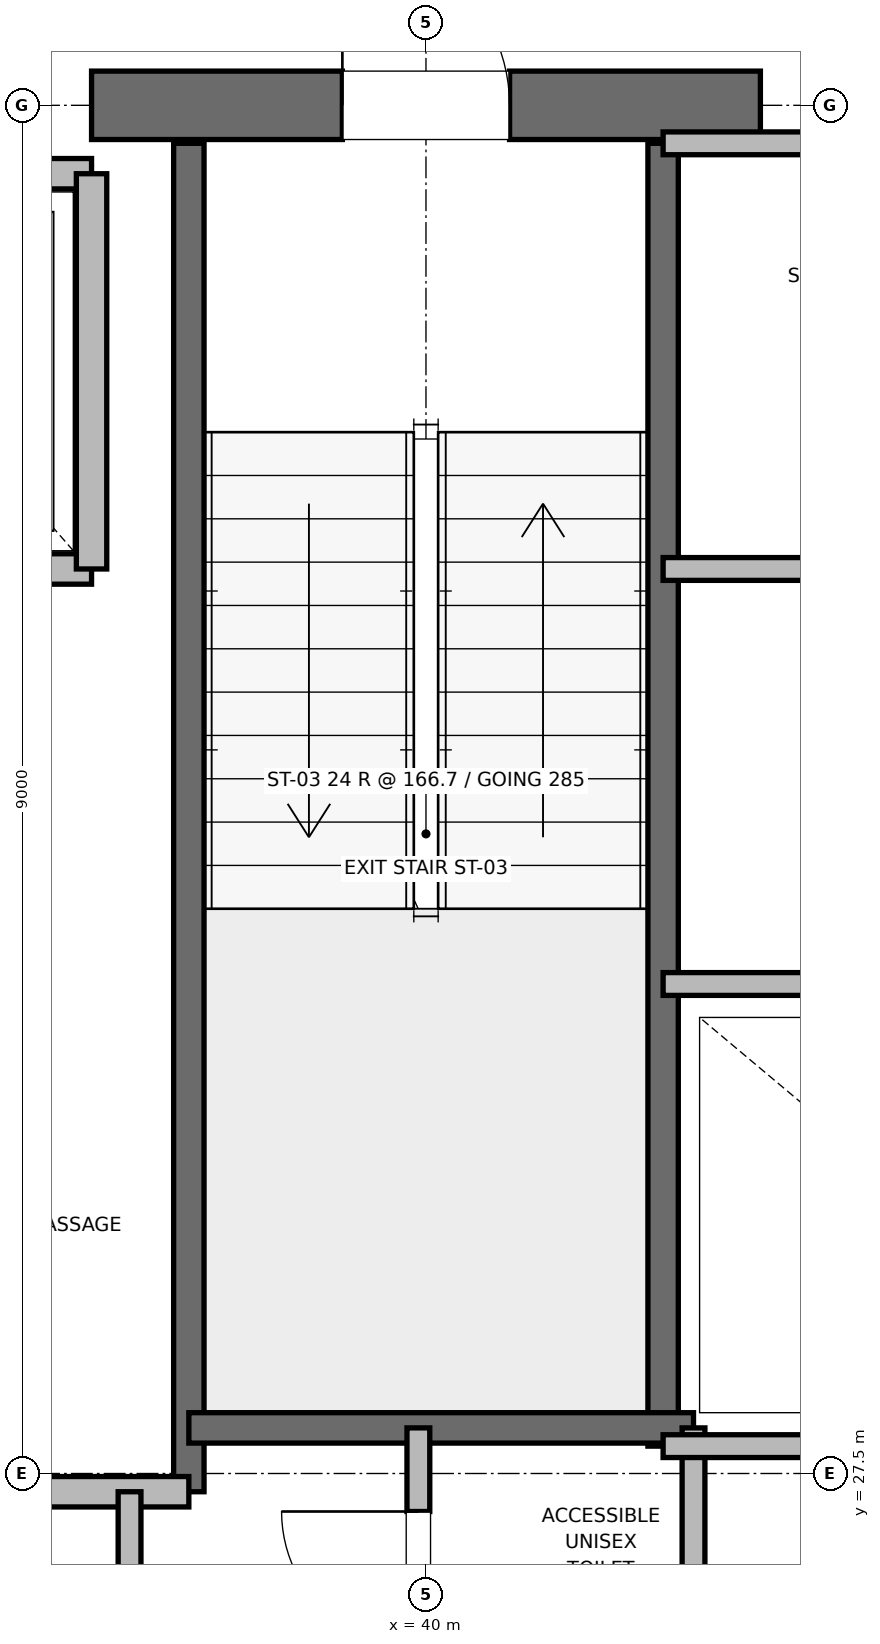
"""IFC4 building model, lengths in metres.
Left out: names, types, materials, properties, quantities, classifications, styles, units other than length and angle.
Written with IfcOpenShell. Run it as: python <this file> out.ifc"""

import sys

from ifc_helpers import new_model, si_unit, direction, frame, frame_2d, origin, place, context, subcontext, project, spatial, rectangle, extrude, element, fill, save


model = new_model("IFC4")
c1 = context("Model", 3, precision=1e-05, world=origin(), true_north=direction((0.0, 1.0)))
c2 = subcontext(c1, "Body", "Model", "MODEL_VIEW")
j1 = project(units=[si_unit("LENGTHUNIT", "METRE"), si_unit("PLANEANGLEUNIT", "RADIAN")], contexts=[c1])
p1 = place(None, origin())
s1 = spatial("IfcSite", under=j1, at=p1, CompositionType="ELEMENT")
p2 = place(p1, origin())
s2 = spatial("IfcBuilding", under=s1, at=p2, CompositionType="ELEMENT")
p3 = place(p2, frame((0.0, 0.0, 275.2)))
s3 = spatial("IfcBuildingStorey", under=s2, at=p3, CompositionType="ELEMENT", Elevation=275.2)
p4 = place(p3, frame((37.8, 36.5, 0.0), z_axis=(0.0, 0.0, 1.0), x_axis=(1.0, 0.0, 0.0)))
e1 = element("IfcWall", 1, at=p4, inside=s3, PredefinedType="SHEAR", context=c2, shape_type="SweptSolid", body=[
    extrude(rectangle(XDim=4.4, YDim=0.45, at=frame_2d((2.2, 0.0))), origin(), (0.0, 0.0, 1.0), 3.785),
])
p5 = place(p4, frame((1.65, 0.0, 0.0)))
e2 = element("IfcOpeningElement", 2, at=p5, cuts=e1, PredefinedType="OPENING", context=c2, shape_type="SweptSolid", body=[
    extrude(rectangle(XDim=1.1, YDim=2.15, at=frame_2d((0.55, 1.075))), frame((0.0, 0.225, 0.0), z_axis=(0.0, -1.0, 0.0), x_axis=(1.0, 0.0, 0.0)), (0.0, 0.0, 1.0), 0.45),
])
p6 = place(p3, frame((38.44, 27.38, 0.0), z_axis=(0.0, 0.0, 1.0), x_axis=(0.0, 1.0, 0.0)))
e3 = element("IfcWall", 3, at=p6, inside=s3, PredefinedType="SOLIDWALL", context=c2, shape_type="SweptSolid", body=[
    extrude(rectangle(XDim=8.87, YDim=0.2, at=frame_2d((4.435, 0.0))), origin(), (0.0, 0.0, 1.0), 3.785),
])
p7 = place(p3, frame((41.56, 27.68, 0.0), z_axis=(0.0, 0.0, 1.0), x_axis=(0.0, 1.0, 0.0)))
e4 = element("IfcWall", 4, at=p7, inside=s3, PredefinedType="SOLIDWALL", context=c2, shape_type="SweptSolid", body=[
    extrude(rectangle(XDim=8.57, YDim=0.2, at=frame_2d((4.285, 0.0))), origin(), (0.0, 0.0, 1.0), 3.785),
])
p8 = place(p3, frame((38.44, 27.8, 0.0), z_axis=(0.0, 0.0, 1.0), x_axis=(1.0, 0.0, 0.0)))
e5 = element("IfcWall", 5, at=p8, inside=s3, PredefinedType="SOLIDWALL", context=c2, shape_type="SweptSolid", body=[
    extrude(rectangle(XDim=3.32, YDim=0.2, at=frame_2d((1.66, 0.0))), origin(), (0.0, 0.0, 1.0), 3.785),
])
p9 = place(p3, frame((32.82, 27.38, 0.0), z_axis=(0.0, 0.0, 1.0), x_axis=(1.0, 0.0, 0.0)))
e6 = element("IfcWall", 6, at=p9, inside=s3, PredefinedType="PARTITIONING", context=c2, shape_type="SweptSolid", body=[
    extrude(rectangle(XDim=5.62, YDim=0.2, at=frame_2d((2.81, 0.0))), origin(), (0.0, 0.0, 1.0), 3.785),
])
p10 = place(p3, frame((35.5, 33.45, 0.0), z_axis=(0.0, 0.0, 1.0), x_axis=(1.0, 0.0, 0.0)))
e7 = element("IfcWall", 7, at=p10, inside=s3, PredefinedType="SOLIDWALL", context=c2, shape_type="SweptSolid", body=[
    extrude(rectangle(XDim=2.3, YDim=0.2, at=frame_2d((1.15, 0.0))), origin(), (0.0, 0.0, 1.0), 3.785),
])
p11 = place(p10, frame((0.6, 0.0, 0.0)))
e8 = element("IfcOpeningElement", 8, at=p11, cuts=e7, PredefinedType="OPENING", context=c2, shape_type="SweptSolid", body=[
    extrude(rectangle(XDim=1.1, YDim=2.2, at=frame_2d((0.55, 1.1))), frame((0.0, 0.1, 0.0), z_axis=(0.0, -1.0, 0.0), x_axis=(1.0, 0.0, 0.0)), (0.0, 0.0, 1.0), 0.2),
])
p12 = place(p3, frame((37.8, 36.05, 0.0), z_axis=(0.0, 0.0, 1.0), x_axis=(-1.0, 0.0, 0.0)))
e9 = element("IfcWall", 9, at=p12, inside=s3, PredefinedType="SOLIDWALL", context=c2, shape_type="SweptSolid", body=[
    extrude(rectangle(XDim=2.3, YDim=0.2, at=frame_2d((1.15, 0.0))), origin(), (0.0, 0.0, 1.0), 2.865),
])
p13 = place(p3, frame((37.8, 33.45, 0.0), z_axis=(0.0, 0.0, 1.0), x_axis=(0.0, 1.0, 0.0)))
e10 = element("IfcWall", 10, at=p13, inside=s3, PredefinedType="SOLIDWALL", context=c2, shape_type="SweptSolid", body=[
    extrude(rectangle(XDim=2.6, YDim=0.2, at=frame_2d((1.3, 0.0))), origin(), (0.0, 0.0, 1.0), 2.865),
])
p14 = place(p3, frame((41.76, 23.8, 0.0), z_axis=(0.0, 0.0, 1.0), x_axis=(0.0, 1.0, 0.0)))
e11 = element("IfcWall", 11, at=p14, inside=s3, PredefinedType="PARTITIONING", context=c2, shape_type="SweptSolid", body=[
    extrude(rectangle(XDim=4.0, YDim=0.15, at=frame_2d((2.0, 0.0))), origin(), (0.0, 0.0, 1.0), 2.85),
])
p15 = place(p3, frame((39.95, 25.8, 0.0), z_axis=(0.0, 0.0, 1.0), x_axis=(0.0, 1.0, 0.0)))
e12 = element("IfcWall", 12, at=p15, inside=s3, PredefinedType="PARTITIONING", context=c2, shape_type="SweptSolid", body=[
    extrude(rectangle(XDim=2.0, YDim=0.15, at=frame_2d((1.0, 0.0))), origin(), (0.0, 0.0, 1.0), 2.85),
])
p16 = place(p15, frame((0.55, 0.0, 0.0)))
e13 = element("IfcOpeningElement", 13, at=p16, cuts=e12, PredefinedType="OPENING", context=c2, shape_type="SweptSolid", body=[
    extrude(rectangle(XDim=0.9, YDim=2.1, at=frame_2d((0.45, 1.05))), frame((0.0, 0.075, 0.0), z_axis=(0.0, -1.0, 0.0), x_axis=(1.0, 0.0, 0.0)), (0.0, 0.0, 1.0), 0.15),
])
p17 = place(p3, frame((38.05, 18.6, 0.0), z_axis=(0.0, 0.0, 1.0), x_axis=(0.0, 1.0, 0.0)))
e14 = element("IfcWall", 14, at=p17, inside=s3, PredefinedType="PARTITIONING", context=c2, shape_type="SweptSolid", body=[
    extrude(rectangle(XDim=8.78, YDim=0.15, at=frame_2d((4.39, 0.0))), origin(), (0.0, 0.0, 1.0), 2.85),
])
p18 = place(p17, frame((3.89, 0.0, 0.0)))
e15 = element("IfcOpeningElement", 15, at=p18, cuts=e14, PredefinedType="OPENING", context=c2, shape_type="SweptSolid", body=[
    extrude(rectangle(XDim=1.0, YDim=2.15, at=frame_2d((0.5, 1.075))), frame((0.0, 0.075, 0.0), z_axis=(0.0, -1.0, 0.0), x_axis=(1.0, 0.0, 0.0)), (0.0, 0.0, 1.0), 0.15),
])
p19 = place(p3, frame((41.56, 27.68, 0.0), z_axis=(0.0, 0.0, 1.0), x_axis=(1.0, 0.0, 0.0)))
e16 = element("IfcWall", 16, at=p19, inside=s3, PredefinedType="PARTITIONING", context=c2, shape_type="SweptSolid", body=[
    extrude(rectangle(XDim=3.59, YDim=0.15, at=frame_2d((1.795, 0.0))), origin(), (0.0, 0.0, 1.0), 2.85),
])
p20 = place(p3, frame((41.56, 30.72, 0.0), z_axis=(0.0, 0.0, 1.0), x_axis=(1.0, 0.0, 0.0)))
e17 = element("IfcWall", 17, at=p20, inside=s3, PredefinedType="PARTITIONING", context=c2, shape_type="SweptSolid", body=[
    extrude(rectangle(XDim=3.59, YDim=0.15, at=frame_2d((1.795, 0.0))), origin(), (0.0, 0.0, 1.0), 2.85),
])
p21 = place(p20, frame((1.355, 0.0, 0.0)))
e18 = element("IfcOpeningElement", 18, at=p21, cuts=e17, PredefinedType="OPENING", context=c2, shape_type="SweptSolid", body=[
    extrude(rectangle(XDim=0.88, YDim=2.1, at=frame_2d((0.44, 1.05))), frame((0.0, 0.075, 0.0), z_axis=(0.0, -1.0, 0.0), x_axis=(1.0, 0.0, 0.0)), (0.0, 0.0, 1.0), 0.15),
])
p22 = place(p3, frame((41.56, 36.25, 0.0), z_axis=(0.0, 0.0, 1.0), x_axis=(1.0, 0.0, 0.0)))
e19 = element("IfcWall", 19, at=p22, inside=s3, PredefinedType="PARTITIONING", context=c2, shape_type="SweptSolid", body=[
    extrude(rectangle(XDim=2.94, YDim=0.15, at=frame_2d((1.47, 0.0))), origin(), (0.0, 0.0, 1.0), 2.85),
])
p23 = place(p3, frame((41.56, 33.45, 0.0), z_axis=(0.0, 0.0, 1.0), x_axis=(1.0, 0.0, 0.0)))
e20 = element("IfcWall", 20, at=p23, inside=s3, PredefinedType="PARTITIONING", context=c2, shape_type="SweptSolid", body=[
    extrude(rectangle(XDim=2.94, YDim=0.15, at=frame_2d((1.47, 0.0))), origin(), (0.0, 0.0, 1.0), 2.85),
])
p24 = place(p23, frame((1.03, 0.0, 0.0)))
e21 = element("IfcOpeningElement", 21, at=p24, cuts=e20, PredefinedType="OPENING", context=c2, shape_type="SweptSolid", body=[
    extrude(rectangle(XDim=0.88, YDim=2.1, at=frame_2d((0.44, 1.05))), frame((0.0, 0.075, 0.0), z_axis=(0.0, -1.0, 0.0), x_axis=(1.0, 0.0, 0.0)), (0.0, 0.0, 1.0), 0.15),
])
p25 = place(p5, origin())
e22 = element("IfcDoor", 22, at=p25, inside=s3, OperationType="SINGLE_SWING_LEFT", PredefinedType="DOOR", context=c2, shape_type="SweptSolid", body=[
    extrude(rectangle(XDim=1.1, YDim=2.15, at=frame_2d((0.55, 1.075))), frame((0.0, 0.025, 0.0), z_axis=(0.0, -1.0, 0.0), x_axis=(1.0, 0.0, 0.0)), (0.0, 0.0, 1.0), 0.05),
])
fill(e2, e22)
p26 = place(p16, origin())
e23 = element("IfcDoor", 23, at=p26, inside=s3, OperationType="SINGLE_SWING_RIGHT", PredefinedType="DOOR", context=c2, shape_type="SweptSolid", body=[
    extrude(rectangle(XDim=0.9, YDim=2.1, at=frame_2d((0.45, 1.05))), frame((0.0, 0.025, 0.0), z_axis=(0.0, -1.0, 0.0), x_axis=(1.0, 0.0, 0.0)), (0.0, 0.0, 1.0), 0.05),
])
fill(e13, e23)
save(model, sys.argv[1])
